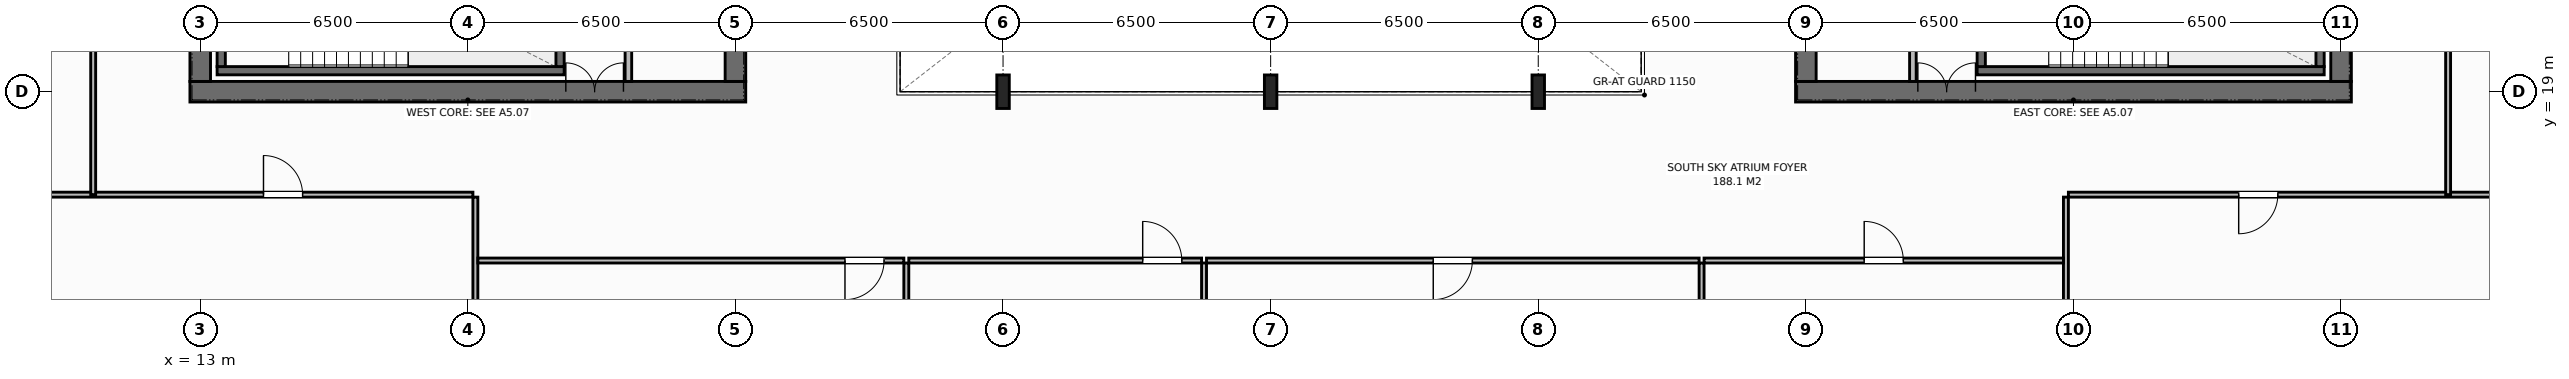
"""IFC4 building model, lengths in metres.
Left out: names, types, materials, properties, quantities, classifications, styles, units other than length and angle.
Written with IfcOpenShell. Run it as: python <this file> out.ifc"""

import sys

from ifc_helpers import new_model, si_unit, direction, frame, frame_2d, origin, origin_2d, place, context, subcontext, project, spatial, rectangle, i_section, extrude, element, fill, save


model = new_model("IFC4")
c1 = context("Model", 3, precision=1e-05, world=origin(), true_north=direction((0.0, 1.0)))
c2 = subcontext(c1, "Body", "Model", "MODEL_VIEW")
j1 = project(units=[si_unit("LENGTHUNIT", "METRE"), si_unit("PLANEANGLEUNIT", "RADIAN")], contexts=[c1])
p1 = place(None, origin())
s1 = spatial("IfcSite", under=j1, at=p1, CompositionType="ELEMENT")
p2 = place(p1, origin())
s2 = spatial("IfcBuilding", under=s1, at=p2, CompositionType="ELEMENT")
p3 = place(p2, frame((0.0, 0.0, 210.0)))
s3 = spatial("IfcBuildingStorey", under=s2, at=p3, CompositionType="ELEMENT", Elevation=210.0)
p4 = place(p3, frame((12.75, 19.0, 0.0), z_axis=(0.0, 0.0, 1.0), x_axis=(1.0, 0.0, 0.0)))
e1 = element("IfcWall", 1, at=p4, inside=s3, PredefinedType="SHEAR", context=c2, shape_type="SweptSolid", body=[
    extrude(rectangle(XDim=13.5, YDim=0.5, at=frame_2d((6.75, 0.0))), origin(), (0.0, 0.0, 1.0), 3.8),
])
p5 = place(p4, frame((9.13, 0.0, 0.0)))
e2 = element("IfcOpeningElement", 2, at=p5, cuts=e1, PredefinedType="OPENING", context=c2, shape_type="SweptSolid", body=[
    extrude(rectangle(XDim=1.4, YDim=2.2, at=frame_2d((0.7, 1.1))), frame((0.0, 0.26, 0.0), z_axis=(0.0, -1.0, 0.0), x_axis=(1.0, 0.0, 0.0)), (0.0, 0.0, 1.0), 0.52),
])
p6 = place(p3, frame((13.0, 19.25, 0.0), z_axis=(0.0, 0.0, 1.0), x_axis=(0.0, 1.0, 0.0)))
e3 = element("IfcWall", 3, at=p6, inside=s3, PredefinedType="SHEAR", context=c2, shape_type="SweptSolid", body=[
    extrude(rectangle(XDim=13.5, YDim=0.5, at=frame_2d((6.75, 0.0))), origin(), (0.0, 0.0, 1.0), 3.8),
])
p7 = place(p6, frame((4.8, 0.0, 0.0)))
e4 = element("IfcOpeningElement", 4, at=p7, cuts=e3, PredefinedType="OPENING", context=c2, shape_type="SweptSolid", body=[
    extrude(rectangle(XDim=1.4, YDim=2.2, at=frame_2d((0.7, 1.1))), frame((0.0, 0.26, 0.0), z_axis=(0.0, -1.0, 0.0), x_axis=(1.0, 0.0, 0.0)), (0.0, 0.0, 1.0), 0.52),
])
p8 = place(p3, frame((26.0, 19.25, 0.0), z_axis=(0.0, 0.0, 1.0), x_axis=(0.0, 1.0, 0.0)))
e5 = element("IfcWall", 5, at=p8, inside=s3, PredefinedType="SHEAR", context=c2, shape_type="SweptSolid", body=[
    extrude(rectangle(XDim=13.5, YDim=0.5, at=frame_2d((6.75, 0.0))), origin(), (0.0, 0.0, 1.0), 3.8),
])
p9 = place(p3, frame((51.75, 19.0, 0.0), z_axis=(0.0, 0.0, 1.0), x_axis=(1.0, 0.0, 0.0)))
e6 = element("IfcWall", 6, at=p9, inside=s3, PredefinedType="SHEAR", context=c2, shape_type="SweptSolid", body=[
    extrude(rectangle(XDim=13.5, YDim=0.5, at=frame_2d((6.75, 0.0))), origin(), (0.0, 0.0, 1.0), 3.8),
])
p10 = place(p9, frame((2.97, 0.0, 0.0)))
e7 = element("IfcOpeningElement", 7, at=p10, cuts=e6, PredefinedType="OPENING", context=c2, shape_type="SweptSolid", body=[
    extrude(rectangle(XDim=1.4, YDim=2.2, at=frame_2d((0.7, 1.1))), frame((0.0, 0.26, 0.0), z_axis=(0.0, -1.0, 0.0), x_axis=(1.0, 0.0, 0.0)), (0.0, 0.0, 1.0), 0.52),
])
p11 = place(p3, frame((52.0, 19.25, 0.0), z_axis=(0.0, 0.0, 1.0), x_axis=(0.0, 1.0, 0.0)))
e8 = element("IfcWall", 8, at=p11, inside=s3, PredefinedType="SHEAR", context=c2, shape_type="SweptSolid", body=[
    extrude(rectangle(XDim=13.5, YDim=0.5, at=frame_2d((6.75, 0.0))), origin(), (0.0, 0.0, 1.0), 3.8),
])
p12 = place(p3, frame((65.0, 19.25, 0.0), z_axis=(0.0, 0.0, 1.0), x_axis=(0.0, 1.0, 0.0)))
e9 = element("IfcWall", 9, at=p12, inside=s3, PredefinedType="SHEAR", context=c2, shape_type="SweptSolid", body=[
    extrude(rectangle(XDim=13.5, YDim=0.5, at=frame_2d((6.75, 0.0))), origin(), (0.0, 0.0, 1.0), 3.8),
])
p13 = place(p12, frame((8.2, 0.0, 0.0)))
e10 = element("IfcOpeningElement", 10, at=p13, cuts=e9, PredefinedType="OPENING", context=c2, shape_type="SweptSolid", body=[
    extrude(rectangle(XDim=1.3, YDim=2.2, at=frame_2d((0.65, 1.1))), frame((0.0, 0.26, 0.0), z_axis=(0.0, -1.0, 0.0), x_axis=(1.0, 0.0, 0.0)), (0.0, 0.0, 1.0), 0.52),
])
p14 = place(p3, frame((13.41, 19.51, 0.0), z_axis=(0.0, 0.0, 1.0), x_axis=(1.0, 0.0, 0.0)))
e11 = element("IfcWall", 11, at=p14, inside=s3, PredefinedType="SHEAR", context=c2, shape_type="SweptSolid", body=[
    extrude(rectangle(XDim=8.43, YDim=0.2, at=frame_2d((4.215, 0.0))), origin(), (0.0, 0.0, 1.0), 3.8),
])
for number, where, z_axis, x_axis in (
    (12, (13.51, 19.61, 0.0), (0.0, 0.0, 1.0), (0.0, 1.0, 0.0)),
    (13, (21.74, 19.61, 0.0), (0.0, 0.0, 1.0), (0.0, 1.0, 0.0)),
):
    element("IfcWall", number, at=place(p3, frame(where, z_axis=z_axis, x_axis=x_axis)), inside=s3, PredefinedType="SHEAR", context=c2, shape_type="SweptSolid", body=[
        extrude(rectangle(XDim=3.28, YDim=0.2, at=frame_2d((1.64, 0.0))), origin(), (0.0, 0.0, 1.0), 3.8),
    ])
p15 = place(p3, frame((56.16, 19.51, 0.0), z_axis=(0.0, 0.0, 1.0), x_axis=(1.0, 0.0, 0.0)))
e14 = element("IfcWall", 14, at=p15, inside=s3, PredefinedType="SHEAR", context=c2, shape_type="SweptSolid", body=[
    extrude(rectangle(XDim=8.43, YDim=0.2, at=frame_2d((4.215, 0.0))), origin(), (0.0, 0.0, 1.0), 3.8),
])
for number, where, z_axis, x_axis in (
    (15, (56.26, 19.61, 0.0), (0.0, 0.0, 1.0), (0.0, 1.0, 0.0)),
    (16, (64.49, 19.61, 0.0), (0.0, 0.0, 1.0), (0.0, 1.0, 0.0)),
):
    element("IfcWall", number, at=place(p3, frame(where, z_axis=z_axis, x_axis=x_axis)), inside=s3, PredefinedType="SHEAR", context=c2, shape_type="SweptSolid", body=[
        extrude(rectangle(XDim=3.28, YDim=0.2, at=frame_2d((1.64, 0.0))), origin(), (0.0, 0.0, 1.0), 3.8),
    ])
for number, where, z_axis, x_axis in (
    (17, (32.5, 19.0, 0.0), (0.0, 0.0, 1.0), (1.0, 0.0, 0.0)),
    (18, (39.0, 19.0, 0.0), (0.0, 0.0, 1.0), (1.0, 0.0, 0.0)),
    (19, (45.5, 19.0, 0.0), (0.0, 0.0, 1.0), (1.0, 0.0, 0.0)),
):
    element("IfcColumn", number, at=place(p3, frame(where, z_axis=z_axis, x_axis=x_axis)), inside=s3, PredefinedType="COLUMN", context=c2, shape_type="SweptSolid", body=[
        extrude(i_section(OverallWidth=0.303, OverallDepth=0.814, WebThickness=0.021, FlangeThickness=0.04, at=origin_2d()), origin(), (0.0, 0.0, 1.0), 3.8),
    ])
p16 = place(p3, frame((23.4, 19.25, 0.0), z_axis=(0.0, 0.0, 1.0), x_axis=(0.0, 1.0, 0.0)))
e20 = element("IfcWall", 20, at=p16, inside=s3, PredefinedType="STANDARD", context=c2, shape_type="SweptSolid", body=[
    extrude(rectangle(XDim=13.5, YDim=0.16, at=frame_2d((6.75, 0.0))), origin(), (0.0, 0.0, 1.0), 3.58),
])
p17 = place(p16, frame((2.25, 0.0, 0.0)))
e21 = element("IfcOpeningElement", 21, at=p17, cuts=e20, PredefinedType="OPENING", context=c2, shape_type="SweptSolid", body=[
    extrude(rectangle(XDim=0.95, YDim=2.15, at=frame_2d((0.475, 1.075))), frame((0.0, 0.09, 0.0), z_axis=(0.0, -1.0, 0.0), x_axis=(1.0, 0.0, 0.0)), (0.0, 0.0, 1.0), 0.18),
])
p18 = place(p16, frame((6.35, 0.0, 0.0)))
e22 = element("IfcOpeningElement", 22, at=p18, cuts=e20, PredefinedType="OPENING", context=c2, shape_type="SweptSolid", body=[
    extrude(rectangle(XDim=0.95, YDim=2.15, at=frame_2d((0.475, 1.075))), frame((0.0, 0.09, 0.0), z_axis=(0.0, -1.0, 0.0), x_axis=(1.0, 0.0, 0.0)), (0.0, 0.0, 1.0), 0.18),
])
p19 = place(p16, frame((9.35, 0.0, 0.0)))
e23 = element("IfcOpeningElement", 23, at=p19, cuts=e20, PredefinedType="OPENING", context=c2, shape_type="SweptSolid", body=[
    extrude(rectangle(XDim=1.1, YDim=2.2, at=frame_2d((0.55, 1.1))), frame((0.0, 0.09, 0.0), z_axis=(0.0, -1.0, 0.0), x_axis=(1.0, 0.0, 0.0)), (0.0, 0.0, 1.0), 0.18),
])
p20 = place(p16, frame((11.55, 0.0, 0.0)))
e24 = element("IfcOpeningElement", 24, at=p20, cuts=e20, PredefinedType="OPENING", context=c2, shape_type="SweptSolid", body=[
    extrude(rectangle(XDim=1.1, YDim=2.2, at=frame_2d((0.55, 1.1))), frame((0.0, 0.09, 0.0), z_axis=(0.0, -1.0, 0.0), x_axis=(1.0, 0.0, 0.0)), (0.0, 0.0, 1.0), 0.18),
])
p21 = place(p3, frame((54.6, 19.25, 0.0), z_axis=(0.0, 0.0, 1.0), x_axis=(0.0, 1.0, 0.0)))
e25 = element("IfcWall", 25, at=p21, inside=s3, PredefinedType="STANDARD", context=c2, shape_type="SweptSolid", body=[
    extrude(rectangle(XDim=13.5, YDim=0.16, at=frame_2d((6.75, 0.0))), origin(), (0.0, 0.0, 1.0), 3.58),
])
p22 = place(p21, frame((2.15, 0.0, 0.0)))
e26 = element("IfcOpeningElement", 26, at=p22, cuts=e25, PredefinedType="OPENING", context=c2, shape_type="SweptSolid", body=[
    extrude(rectangle(XDim=0.95, YDim=2.15, at=frame_2d((0.475, 1.075))), frame((0.0, 0.09, 0.0), z_axis=(0.0, -1.0, 0.0), x_axis=(1.0, 0.0, 0.0)), (0.0, 0.0, 1.0), 0.18),
])
p23 = place(p21, frame((6.25, 0.0, 0.0)))
e27 = element("IfcOpeningElement", 27, at=p23, cuts=e25, PredefinedType="OPENING", context=c2, shape_type="SweptSolid", body=[
    extrude(rectangle(XDim=0.95, YDim=2.15, at=frame_2d((0.475, 1.075))), frame((0.0, 0.09, 0.0), z_axis=(0.0, -1.0, 0.0), x_axis=(1.0, 0.0, 0.0)), (0.0, 0.0, 1.0), 0.18),
])
p24 = place(p21, frame((9.35, 0.0, 0.0)))
e28 = element("IfcOpeningElement", 28, at=p24, cuts=e25, PredefinedType="OPENING", context=c2, shape_type="SweptSolid", body=[
    extrude(rectangle(XDim=1.1, YDim=2.2, at=frame_2d((0.55, 1.1))), frame((0.0, 0.09, 0.0), z_axis=(0.0, -1.0, 0.0), x_axis=(1.0, 0.0, 0.0)), (0.0, 0.0, 1.0), 0.18),
])
p25 = place(p21, frame((11.55, 0.0, 0.0)))
e29 = element("IfcOpeningElement", 29, at=p25, cuts=e25, PredefinedType="OPENING", context=c2, shape_type="SweptSolid", body=[
    extrude(rectangle(XDim=1.1, YDim=2.2, at=frame_2d((0.55, 1.1))), frame((0.0, 0.09, 0.0), z_axis=(0.0, -1.0, 0.0), x_axis=(1.0, 0.0, 0.0)), (0.0, 0.0, 1.0), 0.18),
])
p26 = place(p3, frame((19.683, 5.02, 0.0), z_axis=(0.0, 0.0, 1.0), x_axis=(0.0, 1.0, 0.0)))
e30 = element("IfcWall", 30, at=p26, inside=s3, PredefinedType="PARTITIONING", context=c2, shape_type="SweptSolid", body=[
    extrude(rectangle(XDim=11.42, YDim=0.12, at=frame_2d((5.71, 0.0))), origin(), (0.0, 0.0, 1.0), 2.88),
])
p27 = place(p3, frame((5.98, 16.5, 0.0), z_axis=(0.0, 0.0, 1.0), x_axis=(1.0, 0.0, 0.0)))
e31 = element("IfcWall", 31, at=p27, inside=s3, PredefinedType="PARTITIONING", context=c2, shape_type="SweptSolid", body=[
    extrude(rectangle(XDim=13.643, YDim=0.12, at=frame_2d((6.822, 0.0))), origin(), (0.0, 0.0, 1.0), 3.58),
])
p28 = place(p27, frame((8.557, 0.0, 0.0)))
e32 = element("IfcOpeningElement", 32, at=p28, cuts=e31, PredefinedType="OPENING", context=c2, shape_type="SweptSolid", body=[
    extrude(rectangle(XDim=0.95, YDim=2.15, at=frame_2d((0.475, 1.075))), frame((0.0, 0.07, 0.0), z_axis=(0.0, -1.0, 0.0), x_axis=(1.0, 0.0, 0.0)), (0.0, 0.0, 1.0), 0.14),
])
p29 = place(p3, frame((30.151, 5.02, 0.0), z_axis=(0.0, 0.0, 1.0), x_axis=(0.0, 1.0, 0.0)))
e33 = element("IfcWall", 33, at=p29, inside=s3, PredefinedType="PARTITIONING", context=c2, shape_type="SweptSolid", body=[
    extrude(rectangle(XDim=9.82, YDim=0.12, at=frame_2d((4.91, 0.0))), origin(), (0.0, 0.0, 1.0), 3.58),
])
p30 = place(p3, frame((19.743, 14.9, 0.0), z_axis=(0.0, 0.0, 1.0), x_axis=(1.0, 0.0, 0.0)))
e34 = element("IfcWall", 34, at=p30, inside=s3, PredefinedType="PARTITIONING", context=c2, shape_type="SweptSolid", body=[
    extrude(rectangle(XDim=10.347, YDim=0.12, at=frame_2d((5.174, 0.0))), origin(), (0.0, 0.0, 1.0), 3.58),
])
p31 = place(p30, frame((8.917, 0.0, 0.0)))
e35 = element("IfcOpeningElement", 35, at=p31, cuts=e34, PredefinedType="OPENING", context=c2, shape_type="SweptSolid", body=[
    extrude(rectangle(XDim=0.95, YDim=2.15, at=frame_2d((0.475, 1.075))), frame((0.0, 0.07, 0.0), z_axis=(0.0, -1.0, 0.0), x_axis=(1.0, 0.0, 0.0)), (0.0, 0.0, 1.0), 0.14),
])
p32 = place(p3, frame((37.382, 5.02, 0.0), z_axis=(0.0, 0.0, 1.0), x_axis=(0.0, 1.0, 0.0)))
e36 = element("IfcWall", 36, at=p32, inside=s3, PredefinedType="PARTITIONING", context=c2, shape_type="SweptSolid", body=[
    extrude(rectangle(XDim=9.82, YDim=0.12, at=frame_2d((4.91, 0.0))), origin(), (0.0, 0.0, 1.0), 3.58),
])
p33 = place(p3, frame((30.211, 14.9, 0.0), z_axis=(0.0, 0.0, 1.0), x_axis=(1.0, 0.0, 0.0)))
e37 = element("IfcWall", 37, at=p33, inside=s3, PredefinedType="PARTITIONING", context=c2, shape_type="SweptSolid", body=[
    extrude(rectangle(XDim=7.111, YDim=0.12, at=frame_2d((3.556, 0.0))), origin(), (0.0, 0.0, 1.0), 3.58),
])
p34 = place(p33, frame((5.681, 0.0, 0.0)))
e38 = element("IfcOpeningElement", 38, at=p34, cuts=e37, PredefinedType="OPENING", context=c2, shape_type="SweptSolid", body=[
    extrude(rectangle(XDim=0.95, YDim=2.15, at=frame_2d((0.475, 1.075))), frame((0.0, 0.07, 0.0), z_axis=(0.0, -1.0, 0.0), x_axis=(1.0, 0.0, 0.0)), (0.0, 0.0, 1.0), 0.14),
])
p35 = place(p3, frame((49.467, 5.02, 0.0), z_axis=(0.0, 0.0, 1.0), x_axis=(0.0, 1.0, 0.0)))
e39 = element("IfcWall", 39, at=p35, inside=s3, PredefinedType="PARTITIONING", context=c2, shape_type="SweptSolid", body=[
    extrude(rectangle(XDim=9.82, YDim=0.12, at=frame_2d((4.91, 0.0))), origin(), (0.0, 0.0, 1.0), 3.58),
])
p36 = place(p3, frame((37.442, 14.9, 0.0), z_axis=(0.0, 0.0, 1.0), x_axis=(1.0, 0.0, 0.0)))
e40 = element("IfcWall", 40, at=p36, inside=s3, PredefinedType="PARTITIONING", context=c2, shape_type="SweptSolid", body=[
    extrude(rectangle(XDim=11.965, YDim=0.12, at=frame_2d((5.983, 0.0))), origin(), (0.0, 0.0, 1.0), 3.58),
])
p37 = place(p36, frame((5.508, 0.0, 0.0)))
e41 = element("IfcOpeningElement", 41, at=p37, cuts=e40, PredefinedType="OPENING", context=c2, shape_type="SweptSolid", body=[
    extrude(rectangle(XDim=0.95, YDim=2.15, at=frame_2d((0.475, 1.075))), frame((0.0, 0.07, 0.0), z_axis=(0.0, -1.0, 0.0), x_axis=(1.0, 0.0, 0.0)), (0.0, 0.0, 1.0), 0.14),
])
p38 = place(p3, frame((58.317, 5.02, 0.0), z_axis=(0.0, 0.0, 1.0), x_axis=(0.0, 1.0, 0.0)))
e42 = element("IfcWall", 42, at=p38, inside=s3, PredefinedType="PARTITIONING", context=c2, shape_type="SweptSolid", body=[
    extrude(rectangle(XDim=11.42, YDim=0.12, at=frame_2d((5.71, 0.0))), origin(), (0.0, 0.0, 1.0), 2.88),
])
p39 = place(p3, frame((49.527, 14.9, 0.0), z_axis=(0.0, 0.0, 1.0), x_axis=(1.0, 0.0, 0.0)))
e43 = element("IfcWall", 43, at=p39, inside=s3, PredefinedType="PARTITIONING", context=c2, shape_type="SweptSolid", body=[
    extrude(rectangle(XDim=8.729, YDim=0.12, at=frame_2d((4.365, 0.0))), origin(), (0.0, 0.0, 1.0), 3.58),
])
p40 = place(p39, frame((3.89, 0.0, 0.0)))
e44 = element("IfcOpeningElement", 44, at=p40, cuts=e43, PredefinedType="OPENING", context=c2, shape_type="SweptSolid", body=[
    extrude(rectangle(XDim=0.95, YDim=2.15, at=frame_2d((0.475, 1.075))), frame((0.0, 0.07, 0.0), z_axis=(0.0, -1.0, 0.0), x_axis=(1.0, 0.0, 0.0)), (0.0, 0.0, 1.0), 0.14),
])
p41 = place(p3, frame((58.377, 16.5, 0.0), z_axis=(0.0, 0.0, 1.0), x_axis=(1.0, 0.0, 0.0)))
e45 = element("IfcWall", 45, at=p41, inside=s3, PredefinedType="PARTITIONING", context=c2, shape_type="SweptSolid", body=[
    extrude(rectangle(XDim=13.643, YDim=0.12, at=frame_2d((6.822, 0.0))), origin(), (0.0, 0.0, 1.0), 3.58),
])
p42 = place(p41, frame((4.137, 0.0, 0.0)))
e46 = element("IfcOpeningElement", 46, at=p42, cuts=e45, PredefinedType="OPENING", context=c2, shape_type="SweptSolid", body=[
    extrude(rectangle(XDim=0.95, YDim=2.15, at=frame_2d((0.475, 1.075))), frame((0.0, 0.07, 0.0), z_axis=(0.0, -1.0, 0.0), x_axis=(1.0, 0.0, 0.0)), (0.0, 0.0, 1.0), 0.14),
])
p43 = place(p3, frame((10.4, 16.5, 0.0), z_axis=(0.0, 0.0, 1.0), x_axis=(0.0, 1.0, 0.0)))
e47 = element("IfcWall", 47, at=p43, inside=s3, PredefinedType="PARTITIONING", context=c2, shape_type="SweptSolid", body=[
    extrude(rectangle(XDim=19.0, YDim=0.12, at=frame_2d((9.5, 0.0))), origin(), (0.0, 0.0, 1.0), 3.58),
])
p44 = place(p43, frame((9.025, 0.0, 0.0)))
e48 = element("IfcOpeningElement", 48, at=p44, cuts=e47, PredefinedType="OPENING", context=c2, shape_type="SweptSolid", body=[
    extrude(rectangle(XDim=0.95, YDim=2.15, at=frame_2d((0.475, 1.075))), frame((0.0, 0.07, 0.0), z_axis=(0.0, -1.0, 0.0), x_axis=(1.0, 0.0, 0.0)), (0.0, 0.0, 1.0), 0.14),
])
p45 = place(p3, frame((67.6, 16.5, 0.0), z_axis=(0.0, 0.0, 1.0), x_axis=(0.0, 1.0, 0.0)))
e49 = element("IfcWall", 49, at=p45, inside=s3, PredefinedType="PARTITIONING", context=c2, shape_type="SweptSolid", body=[
    extrude(rectangle(XDim=9.5, YDim=0.12, at=frame_2d((4.75, 0.0))), origin(), (0.0, 0.0, 1.0), 3.58),
])
p46 = place(p45, frame((5.325, 0.0, 0.0)))
e50 = element("IfcOpeningElement", 50, at=p46, cuts=e49, PredefinedType="OPENING", context=c2, shape_type="SweptSolid", body=[
    extrude(rectangle(XDim=0.95, YDim=2.15, at=frame_2d((0.475, 1.075))), frame((0.0, 0.07, 0.0), z_axis=(0.0, -1.0, 0.0), x_axis=(1.0, 0.0, 0.0)), (0.0, 0.0, 1.0), 0.14),
])
p47 = place(p5, origin())
e51 = element("IfcDoor", 51, at=p47, inside=s3, OperationType="DOUBLE_DOOR_SINGLE_SWING", PredefinedType="DOOR", context=c2, shape_type="SweptSolid", body=[
    extrude(rectangle(XDim=1.4, YDim=2.2, at=frame_2d((0.7, 1.1))), frame((0.0, 0.075, 0.0), z_axis=(0.0, -1.0, 0.0), x_axis=(1.0, 0.0, 0.0)), (0.0, 0.0, 1.0), 0.05),
])
fill(e2, e51)
p48 = place(p10, origin())
e52 = element("IfcDoor", 52, at=p48, inside=s3, OperationType="DOUBLE_DOOR_SINGLE_SWING", PredefinedType="DOOR", context=c2, shape_type="SweptSolid", body=[
    extrude(rectangle(XDim=1.4, YDim=2.2, at=frame_2d((0.7, 1.1))), frame((0.0, 0.075, 0.0), z_axis=(0.0, -1.0, 0.0), x_axis=(1.0, 0.0, 0.0)), (0.0, 0.0, 1.0), 0.05),
])
fill(e7, e52)
p49 = place(p28, origin())
e53 = element("IfcDoor", 53, at=p49, inside=s3, OperationType="SINGLE_SWING_LEFT", PredefinedType="DOOR", context=c2, shape_type="SweptSolid", body=[
    extrude(rectangle(XDim=0.95, YDim=2.15, at=frame_2d((0.475, 1.075))), frame((0.0, 0.025, 0.0), z_axis=(0.0, -1.0, 0.0), x_axis=(1.0, 0.0, 0.0)), (0.0, 0.0, 1.0), 0.05),
])
fill(e32, e53)
p50 = place(p31, origin())
e54 = element("IfcDoor", 54, at=p50, inside=s3, OperationType="SINGLE_SWING_RIGHT", PredefinedType="DOOR", context=c2, shape_type="SweptSolid", body=[
    extrude(rectangle(XDim=0.95, YDim=2.15, at=frame_2d((0.475, 1.075))), frame((0.0, 0.025, 0.0), z_axis=(0.0, -1.0, 0.0), x_axis=(1.0, 0.0, 0.0)), (0.0, 0.0, 1.0), 0.05),
])
fill(e35, e54)
p51 = place(p34, origin())
e55 = element("IfcDoor", 55, at=p51, inside=s3, OperationType="SINGLE_SWING_LEFT", PredefinedType="DOOR", context=c2, shape_type="SweptSolid", body=[
    extrude(rectangle(XDim=0.95, YDim=2.15, at=frame_2d((0.475, 1.075))), frame((0.0, 0.025, 0.0), z_axis=(0.0, -1.0, 0.0), x_axis=(1.0, 0.0, 0.0)), (0.0, 0.0, 1.0), 0.05),
])
fill(e38, e55)
p52 = place(p37, origin())
e56 = element("IfcDoor", 56, at=p52, inside=s3, OperationType="SINGLE_SWING_RIGHT", PredefinedType="DOOR", context=c2, shape_type="SweptSolid", body=[
    extrude(rectangle(XDim=0.95, YDim=2.15, at=frame_2d((0.475, 1.075))), frame((0.0, 0.025, 0.0), z_axis=(0.0, -1.0, 0.0), x_axis=(1.0, 0.0, 0.0)), (0.0, 0.0, 1.0), 0.05),
])
fill(e41, e56)
p53 = place(p40, origin())
e57 = element("IfcDoor", 57, at=p53, inside=s3, OperationType="SINGLE_SWING_LEFT", PredefinedType="DOOR", context=c2, shape_type="SweptSolid", body=[
    extrude(rectangle(XDim=0.95, YDim=2.15, at=frame_2d((0.475, 1.075))), frame((0.0, 0.025, 0.0), z_axis=(0.0, -1.0, 0.0), x_axis=(1.0, 0.0, 0.0)), (0.0, 0.0, 1.0), 0.05),
])
fill(e44, e57)
p54 = place(p42, origin())
e58 = element("IfcDoor", 58, at=p54, inside=s3, OperationType="SINGLE_SWING_RIGHT", PredefinedType="DOOR", context=c2, shape_type="SweptSolid", body=[
    extrude(rectangle(XDim=0.95, YDim=2.15, at=frame_2d((0.475, 1.075))), frame((0.0, 0.025, 0.0), z_axis=(0.0, -1.0, 0.0), x_axis=(1.0, 0.0, 0.0)), (0.0, 0.0, 1.0), 0.05),
])
fill(e46, e58)
save(model, sys.argv[1])
